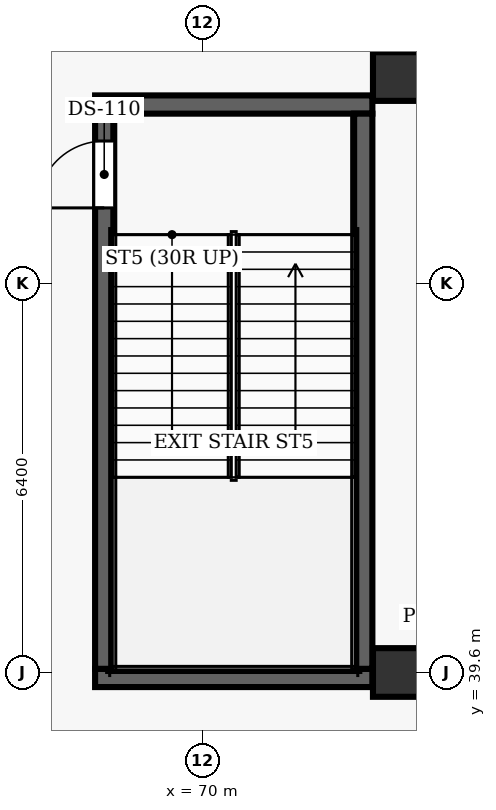
"""IFC4 building model, lengths in metres.
Left out: names, types, materials, properties, quantities, classifications, styles, units other than length and angle.
Written with IfcOpenShell. Run it as: python <this file> out.ifc"""

import sys

from ifc_helpers import new_model, si_unit, direction, frame, frame_2d, origin, origin_2d, place, context, subcontext, project, spatial, rectangle, extrude, element, fill, save


model = new_model("IFC4")
c1 = context("Model", 3, precision=1e-05, world=origin(), true_north=direction((0.0, 1.0)))
c2 = subcontext(c1, "Body", "Model", "MODEL_VIEW")
j1 = project(units=[si_unit("LENGTHUNIT", "METRE"), si_unit("PLANEANGLEUNIT", "RADIAN")], contexts=[c1])
p1 = place(None, origin())
s1 = spatial("IfcSite", under=j1, at=p1, CompositionType="ELEMENT")
p2 = place(p1, origin())
s2 = spatial("IfcBuilding", under=s1, at=p2, CompositionType="ELEMENT")
p3 = place(p2, frame((0.0, 0.0, 18.6)))
s3 = spatial("IfcBuildingStorey", under=s2, at=p3, CompositionType="ELEMENT", Elevation=18.6)
for number, where, z_axis, x_axis in (
    (1, (73.2, 39.6, 0.0), (0.0, 0.0, 1.0), (1.0, 0.0, 0.0)),
    (2, (73.2, 49.4, 0.0), (0.0, 0.0, 1.0), (1.0, 0.0, 0.0)),
):
    element("IfcColumn", number, at=place(p3, frame(where, z_axis=z_axis, x_axis=x_axis)), inside=s3, PredefinedType="COLUMN", context=c2, shape_type="SweptSolid", body=[
        extrude(rectangle(XDim=0.8, YDim=0.8, at=origin_2d()), origin(), (0.0, 0.0, 1.0), 5.4),
    ])
for number, where, z_axis, x_axis in (
    (3, (68.23, 39.51, 0.0), (0.0, 0.0, 1.0), (1.0, 0.0, 0.0)),
    (4, (68.23, 48.94, 0.0), (0.0, 0.0, 1.0), (1.0, 0.0, 0.0)),
):
    element("IfcWall", number, at=place(p3, frame(where, z_axis=z_axis, x_axis=x_axis)), inside=s3, PredefinedType="SHEAR", context=c2, shape_type="SweptSolid", body=[
        extrude(rectangle(XDim=4.56, YDim=0.3, at=frame_2d((2.28, 0.0))), origin(), (0.0, 0.0, 1.0), 5.4),
    ])
p4 = place(p3, frame((68.38, 39.66, 0.0), z_axis=(0.0, 0.0, 1.0), x_axis=(0.0, 1.0, 0.0)))
e5 = element("IfcWall", 5, at=p4, inside=s3, PredefinedType="SHEAR", context=c2, shape_type="SweptSolid", body=[
    extrude(rectangle(XDim=9.13, YDim=0.3, at=frame_2d((4.565, 0.0))), origin(), (0.0, 0.0, 1.0), 5.4),
])
p5 = place(p4, frame((7.58, 0.0, 0.0)))
e6 = element("IfcOpeningElement", 6, at=p5, cuts=e5, PredefinedType="OPENING", context=c2, shape_type="SweptSolid", body=[
    extrude(rectangle(XDim=1.1, YDim=2.15, at=frame_2d((0.55, 1.075))), frame((0.0, 0.16, 0.0), z_axis=(0.0, -1.0, 0.0), x_axis=(1.0, 0.0, 0.0)), (0.0, 0.0, 1.0), 0.32),
])
p6 = place(p3, frame((72.64, 48.79, 0.0), z_axis=(0.0, 0.0, 1.0), x_axis=(0.0, -1.0, 0.0)))
e7 = element("IfcWall", 7, at=p6, inside=s3, PredefinedType="SHEAR", context=c2, shape_type="SweptSolid", body=[
    extrude(rectangle(XDim=9.13, YDim=0.3, at=frame_2d((4.565, 0.0))), origin(), (0.0, 0.0, 1.0), 5.4),
])
p7 = place(p5, origin())
e8 = element("IfcDoor", 8, at=p7, inside=s3, OperationType="SINGLE_SWING_LEFT", PredefinedType="DOOR", context=c2, shape_type="SweptSolid", body=[
    extrude(rectangle(XDim=1.1, YDim=2.15, at=frame_2d((0.55, 1.075))), frame((0.0, 0.025, 0.0), z_axis=(0.0, -1.0, 0.0), x_axis=(1.0, 0.0, 0.0)), (0.0, 0.0, 1.0), 0.05),
])
fill(e6, e8)
save(model, sys.argv[1])
